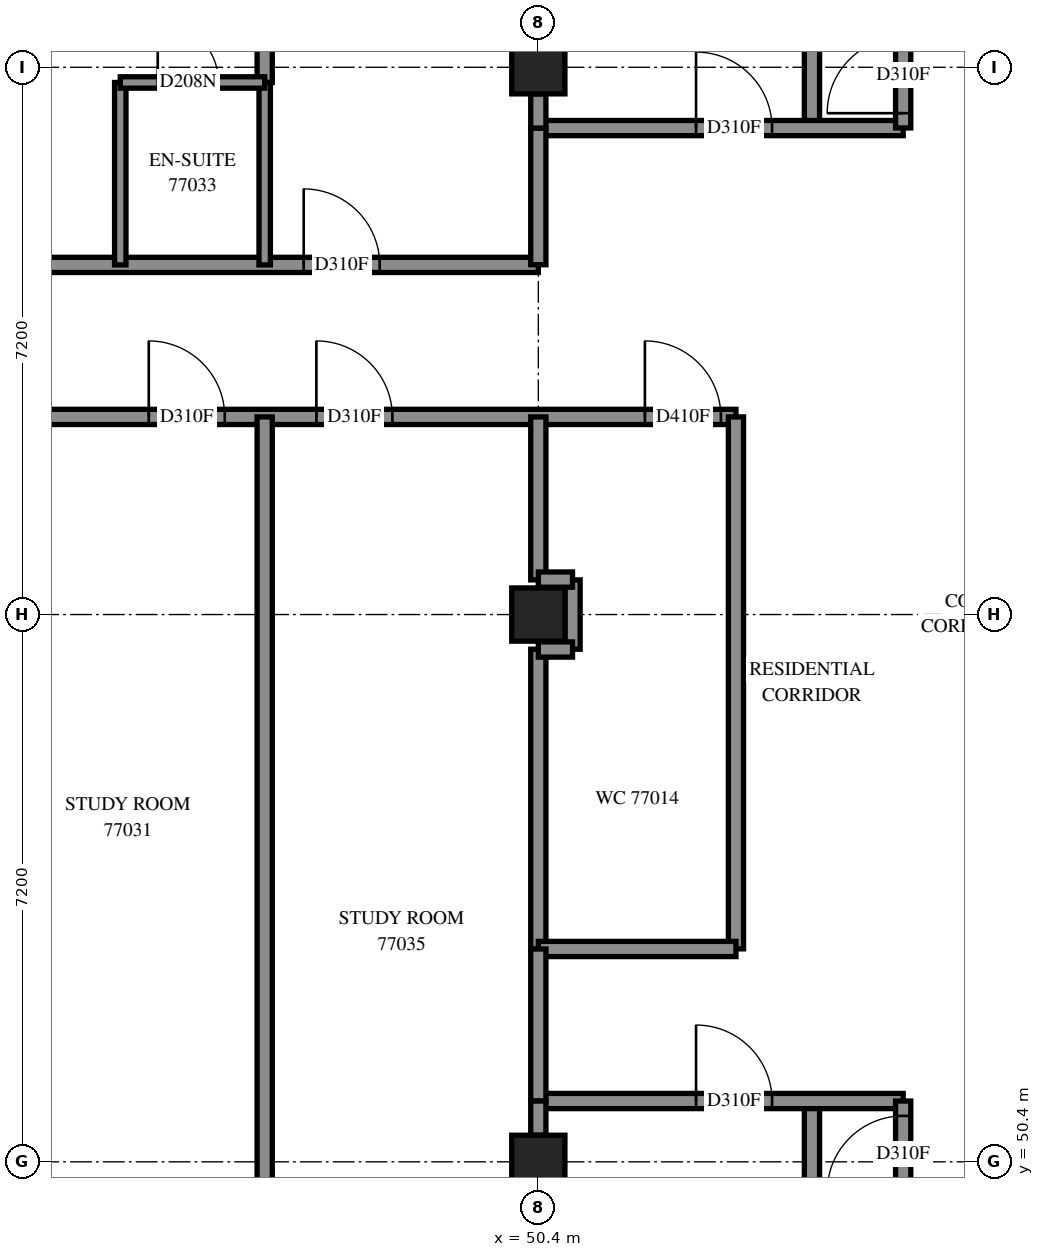
"""IFC4 building model, lengths in metres.
Left out: names, types, materials, properties, quantities, classifications, styles, units other than length and angle.
Written with IfcOpenShell. Run it as: python <this file> out.ifc"""

import sys

from ifc_helpers import new_model, si_unit, direction, frame, frame_2d, origin, origin_2d, place, context, subcontext, project, spatial, rectangle, extrude, element, fill, save


model = new_model("IFC4")
c1 = context("Model", 3, precision=1e-05, world=origin(), true_north=direction((0.0, 1.0)))
c2 = subcontext(c1, "Body", "Model", "MODEL_VIEW")
j1 = project(units=[si_unit("LENGTHUNIT", "METRE"), si_unit("PLANEANGLEUNIT", "RADIAN")], contexts=[c1])
p1 = place(None, origin())
s1 = spatial("IfcSite", under=j1, at=p1, CompositionType="ELEMENT")
p2 = place(p1, origin())
s2 = spatial("IfcBuilding", under=s1, at=p2, CompositionType="ELEMENT")
p3 = place(p2, frame((0.0, 0.0, 281.2)))
s3 = spatial("IfcBuildingStorey", under=s2, at=p3, CompositionType="ELEMENT", Elevation=281.2)
for number, where, z_axis, x_axis in (
    (1, (50.4, 50.4, 0.0), (0.0, 0.0, 1.0), (1.0, 0.0, 0.0)),
    (2, (50.4, 57.6, 0.0), (0.0, 0.0, 1.0), (1.0, 0.0, 0.0)),
    (3, (50.4, 64.8, 0.0), (0.0, 0.0, 1.0), (1.0, 0.0, 0.0)),
):
    element("IfcColumn", number, at=place(p3, frame(where, z_axis=z_axis, x_axis=x_axis)), inside=s3, PredefinedType="COLUMN", context=c2, shape_type="SweptSolid", body=[
        extrude(rectangle(XDim=0.7, YDim=0.7, at=origin_2d()), origin(), (0.0, 0.0, 1.0), 3.1),
    ])
p4 = place(p3, frame((36.0, 60.2, 0.0), z_axis=(0.0, 0.0, 1.0), x_axis=(1.0, 0.0, 0.0)))
e4 = element("IfcWall", 4, at=p4, inside=s3, PredefinedType="PARTITIONING", context=c2, shape_type="SweptSolid", body=[
    extrude(rectangle(XDim=17.0, YDim=0.2, at=frame_2d((8.5, 0.0))), origin(), (0.0, 0.0, 1.0), 3.1),
])
p5 = place(p4, frame((15.802, 0.0, 0.0)))
e5 = element("IfcOpeningElement", 5, at=p5, cuts=e4, PredefinedType="OPENING", context=c2, shape_type="SweptSolid", body=[
    extrude(rectangle(XDim=1.0, YDim=2.1, at=frame_2d((0.5, 1.05))), frame((0.0, 0.11, 0.0), z_axis=(0.0, -1.0, 0.0), x_axis=(1.0, 0.0, 0.0)), (0.0, 0.0, 1.0), 0.22),
])
p6 = place(p4, frame((2.075, 0.0, 0.0)))
e6 = element("IfcOpeningElement", 6, at=p6, cuts=e4, PredefinedType="OPENING", context=c2, shape_type="SweptSolid", body=[
    extrude(rectangle(XDim=1.0, YDim=2.1, at=frame_2d((0.5, 1.05))), frame((0.0, 0.11, 0.0), z_axis=(0.0, -1.0, 0.0), x_axis=(1.0, 0.0, 0.0)), (0.0, 0.0, 1.0), 0.22),
])
p7 = place(p4, frame((4.125, 0.0, 0.0)))
e7 = element("IfcOpeningElement", 7, at=p7, cuts=e4, PredefinedType="OPENING", context=c2, shape_type="SweptSolid", body=[
    extrude(rectangle(XDim=1.0, YDim=2.1, at=frame_2d((0.5, 1.05))), frame((0.0, 0.11, 0.0), z_axis=(0.0, -1.0, 0.0), x_axis=(1.0, 0.0, 0.0)), (0.0, 0.0, 1.0), 0.22),
])
p8 = place(p4, frame((9.275, 0.0, 0.0)))
e8 = element("IfcOpeningElement", 8, at=p8, cuts=e4, PredefinedType="OPENING", context=c2, shape_type="SweptSolid", body=[
    extrude(rectangle(XDim=1.0, YDim=2.1, at=frame_2d((0.5, 1.05))), frame((0.0, 0.11, 0.0), z_axis=(0.0, -1.0, 0.0), x_axis=(1.0, 0.0, 0.0)), (0.0, 0.0, 1.0), 0.22),
])
p9 = place(p4, frame((11.48, 0.0, 0.0)))
e9 = element("IfcOpeningElement", 9, at=p9, cuts=e4, PredefinedType="OPENING", context=c2, shape_type="SweptSolid", body=[
    extrude(rectangle(XDim=1.0, YDim=2.1, at=frame_2d((0.5, 1.05))), frame((0.0, 0.11, 0.0), z_axis=(0.0, -1.0, 0.0), x_axis=(1.0, 0.0, 0.0)), (0.0, 0.0, 1.0), 0.22),
])
p10 = place(p3, frame((46.8, 49.65, 0.0), z_axis=(0.0, 0.0, 1.0), x_axis=(0.0, 1.0, 0.0)))
e10 = element("IfcWall", 10, at=p10, inside=s3, PredefinedType="PARTITIONING", context=c2, shape_type="SweptSolid", body=[
    extrude(rectangle(XDim=10.55, YDim=0.2, at=frame_2d((5.275, 0.0))), origin(), (0.0, 0.0, 1.0), 3.1),
])
p11 = place(p3, frame((40.602, 62.2, 0.0), z_axis=(0.0, 0.0, 1.0), x_axis=(1.0, 0.0, 0.0)))
e11 = element("IfcWall", 11, at=p11, inside=s3, PredefinedType="PARTITIONING", context=c2, shape_type="SweptSolid", body=[
    extrude(rectangle(XDim=9.798, YDim=0.2, at=frame_2d((4.899, 0.0))), origin(), (0.0, 0.0, 1.0), 3.1),
])
p12 = place(p11, frame((1.306, 0.0, 0.0)))
e12 = element("IfcOpeningElement", 12, at=p12, cuts=e11, PredefinedType="OPENING", context=c2, shape_type="SweptSolid", body=[
    extrude(rectangle(XDim=0.9, YDim=2.1, at=frame_2d((0.45, 1.05))), frame((0.0, 0.11, 0.0), z_axis=(0.0, -1.0, 0.0), x_axis=(1.0, 0.0, 0.0)), (0.0, 0.0, 1.0), 0.22),
])
p13 = place(p11, frame((6.711, 0.0, 0.0)))
e13 = element("IfcOpeningElement", 13, at=p13, cuts=e11, PredefinedType="OPENING", context=c2, shape_type="SweptSolid", body=[
    extrude(rectangle(XDim=1.0, YDim=2.1, at=frame_2d((0.5, 1.05))), frame((0.0, 0.11, 0.0), z_axis=(0.0, -1.0, 0.0), x_axis=(1.0, 0.0, 0.0)), (0.0, 0.0, 1.0), 0.22),
])
p14 = place(p3, frame((54.0, 64.0, 0.0), z_axis=(0.0, 0.0, 1.0), x_axis=(0.0, 1.0, 0.0)))
e14 = element("IfcWall", 14, at=p14, inside=s3, PredefinedType="PARTITIONING", context=c2, shape_type="SweptSolid", body=[
    extrude(rectangle(XDim=8.862, YDim=0.2, at=frame_2d((4.431, 0.0))), origin(), (0.0, 0.0, 1.0), 3.1),
])
p15 = place(p3, frame((54.0, 42.45, 0.0), z_axis=(0.0, 0.0, 1.0), x_axis=(0.0, 1.0, 0.0)))
e15 = element("IfcWall", 15, at=p15, inside=s3, PredefinedType="PARTITIONING", context=c2, shape_type="SweptSolid", body=[
    extrude(rectangle(XDim=8.75, YDim=0.2, at=frame_2d((4.375, 0.0))), origin(), (0.0, 0.0, 1.0), 3.1),
])
p16 = place(p3, frame((46.8, 64.6, 0.0), z_axis=(0.0, 0.0, 1.0), x_axis=(0.0, 1.0, 0.0)))
e16 = element("IfcWall", 16, at=p16, inside=s3, PredefinedType="PARTITIONING", context=c2, shape_type="SweptSolid", body=[
    extrude(rectangle(XDim=8.15, YDim=0.2, at=frame_2d((4.075, 0.0))), origin(), (0.0, 0.0, 1.0), 3.1),
])
p17 = place(p3, frame((53.0, 53.202, 0.0), z_axis=(0.0, 0.0, 1.0), x_axis=(0.0, 1.0, 0.0)))
e17 = element("IfcWall", 17, at=p17, inside=s3, PredefinedType="PARTITIONING", context=c2, shape_type="SweptSolid", body=[
    extrude(rectangle(XDim=6.998, YDim=0.2, at=frame_2d((3.499, 0.0))), origin(), (0.0, 0.0, 1.0), 3.1),
])
p18 = place(p3, frame((50.4, 51.2, 0.0), z_axis=(0.0, 0.0, 1.0), x_axis=(1.0, 0.0, 0.0)))
e18 = element("IfcWall", 18, at=p18, inside=s3, PredefinedType="PARTITIONING", context=c2, shape_type="SweptSolid", body=[
    extrude(rectangle(XDim=4.8, YDim=0.2, at=frame_2d((2.4, 0.0))), origin(), (0.0, 0.0, 1.0), 3.1),
])
p19 = place(p18, frame((2.075, 0.0, 0.0)))
e19 = element("IfcOpeningElement", 19, at=p19, cuts=e18, PredefinedType="OPENING", context=c2, shape_type="SweptSolid", body=[
    extrude(rectangle(XDim=1.0, YDim=2.1, at=frame_2d((0.5, 1.05))), frame((0.0, 0.11, 0.0), z_axis=(0.0, -1.0, 0.0), x_axis=(1.0, 0.0, 0.0)), (0.0, 0.0, 1.0), 0.22),
])
p20 = place(p3, frame((50.4, 64.0, 0.0), z_axis=(0.0, 0.0, 1.0), x_axis=(1.0, 0.0, 0.0)))
e20 = element("IfcWall", 20, at=p20, inside=s3, PredefinedType="PARTITIONING", context=c2, shape_type="SweptSolid", body=[
    extrude(rectangle(XDim=4.8, YDim=0.2, at=frame_2d((2.4, 0.0))), origin(), (0.0, 0.0, 1.0), 3.1),
])
p21 = place(p20, frame((2.075, 0.0, 0.0)))
e21 = element("IfcOpeningElement", 21, at=p21, cuts=e20, PredefinedType="OPENING", context=c2, shape_type="SweptSolid", body=[
    extrude(rectangle(XDim=1.0, YDim=2.1, at=frame_2d((0.5, 1.05))), frame((0.0, 0.11, 0.0), z_axis=(0.0, -1.0, 0.0), x_axis=(1.0, 0.0, 0.0)), (0.0, 0.0, 1.0), 0.22),
])
p22 = place(p3, frame((50.4, 53.2, 0.0), z_axis=(0.0, 0.0, 1.0), x_axis=(0.0, 1.0, 0.0)))
e22 = element("IfcWall", 22, at=p22, inside=s3, PredefinedType="PARTITIONING", context=c2, shape_type="SweptSolid", body=[
    extrude(rectangle(XDim=3.944, YDim=0.2, at=frame_2d((1.972, 0.0))), origin(), (0.0, 0.0, 1.0), 3.1),
])
p23 = place(p3, frame((55.2, 48.0, 0.0), z_axis=(0.0, 0.0, 1.0), x_axis=(0.0, 1.0, 0.0)))
e23 = element("IfcWall", 23, at=p23, inside=s3, PredefinedType="PARTITIONING", context=c2, shape_type="SweptSolid", body=[
    extrude(rectangle(XDim=3.2, YDim=0.2, at=frame_2d((1.6, 0.0))), origin(), (0.0, 0.0, 1.0), 3.1),
])
p24 = place(p23, frame((2.004, 0.0, 0.0)))
e24 = element("IfcOpeningElement", 24, at=p24, cuts=e23, PredefinedType="OPENING", context=c2, shape_type="SweptSolid", body=[
    extrude(rectangle(XDim=1.0, YDim=2.1, at=frame_2d((0.5, 1.05))), frame((0.0, 0.11, 0.0), z_axis=(0.0, -1.0, 0.0), x_axis=(1.0, 0.0, 0.0)), (0.0, 0.0, 1.0), 0.22),
])
p25 = place(p3, frame((55.2, 64.002, 0.0), z_axis=(0.0, 0.0, 1.0), x_axis=(0.0, 1.0, 0.0)))
e25 = element("IfcWall", 25, at=p25, inside=s3, PredefinedType="PARTITIONING", context=c2, shape_type="SweptSolid", body=[
    extrude(rectangle(XDim=3.198, YDim=0.2, at=frame_2d((1.599, 0.0))), origin(), (0.0, 0.0, 1.0), 3.1),
])
p26 = place(p25, frame((0.194, 0.0, 0.0)))
e26 = element("IfcOpeningElement", 26, at=p26, cuts=e25, PredefinedType="OPENING", context=c2, shape_type="SweptSolid", body=[
    extrude(rectangle(XDim=1.0, YDim=2.1, at=frame_2d((0.5, 1.05))), frame((0.0, 0.11, 0.0), z_axis=(0.0, -1.0, 0.0), x_axis=(1.0, 0.0, 0.0)), (0.0, 0.0, 1.0), 0.22),
])
p27 = place(p3, frame((50.4, 53.2, 0.0), z_axis=(0.0, 0.0, 1.0), x_axis=(1.0, 0.0, 0.0)))
e27 = element("IfcWall", 27, at=p27, inside=s3, PredefinedType="PARTITIONING", context=c2, shape_type="SweptSolid", body=[
    extrude(rectangle(XDim=2.6, YDim=0.2, at=frame_2d((1.3, 0.0))), origin(), (0.0, 0.0, 1.0), 3.1),
])
for number, where, z_axis, x_axis in (
    (28, (44.9, 62.2, 0.0), (0.0, 0.0, 1.0), (0.0, 1.0, 0.0)),
    (29, (46.8, 62.2, 0.0), (0.0, 0.0, 1.0), (0.0, 1.0, 0.0)),
):
    element("IfcWall", number, at=place(p3, frame(where, z_axis=z_axis, x_axis=x_axis)), inside=s3, PredefinedType="PARTITIONING", context=c2, shape_type="SweptSolid", body=[
        extrude(rectangle(XDim=2.4, YDim=0.15, at=frame_2d((1.2, 0.0))), origin(), (0.0, 0.0, 1.0), 3.1),
    ])
p28 = place(p3, frame((50.4, 58.056, 0.0), z_axis=(0.0, 0.0, 1.0), x_axis=(0.0, 1.0, 0.0)))
e30 = element("IfcWall", 30, at=p28, inside=s3, PredefinedType="PARTITIONING", context=c2, shape_type="SweptSolid", body=[
    extrude(rectangle(XDim=2.144, YDim=0.2, at=frame_2d((1.072, 0.0))), origin(), (0.0, 0.0, 1.0), 3.1),
])
p29 = place(p3, frame((50.4, 51.2, 0.0), z_axis=(0.0, 0.0, 1.0), x_axis=(0.0, 1.0, 0.0)))
e31 = element("IfcWall", 31, at=p29, inside=s3, PredefinedType="PARTITIONING", context=c2, shape_type="SweptSolid", body=[
    extrude(rectangle(XDim=2.0, YDim=0.2, at=frame_2d((1.0, 0.0))), origin(), (0.0, 0.0, 1.0), 3.1),
])
p30 = place(p3, frame((44.9, 64.6, 0.0), z_axis=(0.0, 0.0, 1.0), x_axis=(1.0, 0.0, 0.0)))
e32 = element("IfcWall", 32, at=p30, inside=s3, PredefinedType="PARTITIONING", context=c2, shape_type="SweptSolid", body=[
    extrude(rectangle(XDim=1.9, YDim=0.15, at=frame_2d((0.95, 0.0))), origin(), (0.0, 0.0, 1.0), 3.1),
])
p31 = place(p30, frame((0.493, 0.0, 0.0)))
e33 = element("IfcOpeningElement", 33, at=p31, cuts=e32, PredefinedType="OPENING", context=c2, shape_type="SweptSolid", body=[
    extrude(rectangle(XDim=0.8, YDim=2.1, at=frame_2d((0.4, 1.05))), frame((0.0, 0.085, 0.0), z_axis=(0.0, -1.0, 0.0), x_axis=(1.0, 0.0, 0.0)), (0.0, 0.0, 1.0), 0.17),
])
p32 = place(p3, frame((50.4, 62.202, 0.0), z_axis=(0.0, 0.0, 1.0), x_axis=(0.0, 1.0, 0.0)))
e34 = element("IfcWall", 34, at=p32, inside=s3, PredefinedType="PARTITIONING", context=c2, shape_type="SweptSolid", body=[
    extrude(rectangle(XDim=1.798, YDim=0.2, at=frame_2d((0.899, 0.0))), origin(), (0.0, 0.0, 1.0), 3.1),
])
p33 = place(p3, frame((50.85, 57.144, 0.0), z_axis=(0.0, 0.0, 1.0), x_axis=(0.0, 1.0, 0.0)))
e35 = element("IfcWall", 35, at=p33, inside=s3, PredefinedType="PARTITIONING", context=c2, shape_type="SweptSolid", body=[
    extrude(rectangle(XDim=0.912, YDim=0.2, at=frame_2d((0.456, 0.0))), origin(), (0.0, 0.0, 1.0), 3.1),
])
for number, where, z_axis, x_axis in (
    (36, (50.4, 50.75, 0.0), (0.0, 0.0, 1.0), (0.0, 1.0, 0.0)),
    (37, (50.4, 64.0, 0.0), (0.0, 0.0, 1.0), (0.0, 1.0, 0.0)),
    (38, (50.4, 57.14, 0.0), (0.0, 0.0, 1.0), (1.0, 0.0, 0.0)),
    (39, (50.4, 58.06, 0.0), (0.0, 0.0, 1.0), (1.0, 0.0, 0.0)),
):
    element("IfcWall", number, at=place(p3, frame(where, z_axis=z_axis, x_axis=x_axis)), inside=s3, PredefinedType="PARTITIONING", context=c2, shape_type="SweptSolid", body=[
        extrude(rectangle(XDim=0.45, YDim=0.2, at=frame_2d((0.225, 0.0))), origin(), (0.0, 0.0, 1.0), 3.1),
    ])
p34 = place(p5, origin())
e40 = element("IfcDoor", 40, at=p34, inside=s3, OperationType="SINGLE_SWING_LEFT", PredefinedType="DOOR", context=c2, shape_type="SweptSolid", body=[
    extrude(rectangle(XDim=1.0, YDim=2.1, at=frame_2d((0.5, 1.05))), frame((0.0, 0.025, 0.0), z_axis=(0.0, -1.0, 0.0), x_axis=(1.0, 0.0, 0.0)), (0.0, 0.0, 1.0), 0.05),
])
fill(e5, e40)
p35 = place(p21, origin())
e41 = element("IfcDoor", 41, at=p35, inside=s3, OperationType="SINGLE_SWING_RIGHT", PredefinedType="DOOR", context=c2, shape_type="SweptSolid", body=[
    extrude(rectangle(XDim=1.0, YDim=2.1, at=frame_2d((0.5, 1.05))), frame((0.0, 0.025, 0.0), z_axis=(0.0, -1.0, 0.0), x_axis=(1.0, 0.0, 0.0)), (0.0, 0.0, 1.0), 0.05),
])
fill(e21, e41)
p36 = place(p26, origin())
e42 = element("IfcDoor", 42, at=p36, inside=s3, OperationType="SINGLE_SWING_LEFT", PredefinedType="DOOR", context=c2, shape_type="SweptSolid", body=[
    extrude(rectangle(XDim=1.0, YDim=2.1, at=frame_2d((0.5, 1.05))), frame((0.0, 0.025, 0.0), z_axis=(0.0, -1.0, 0.0), x_axis=(1.0, 0.0, 0.0)), (0.0, 0.0, 1.0), 0.05),
])
fill(e26, e42)
p37 = place(p8, origin())
e43 = element("IfcDoor", 43, at=p37, inside=s3, OperationType="SINGLE_SWING_LEFT", PredefinedType="DOOR", context=c2, shape_type="SweptSolid", body=[
    extrude(rectangle(XDim=1.0, YDim=2.1, at=frame_2d((0.5, 1.05))), frame((0.0, 0.025, 0.0), z_axis=(0.0, -1.0, 0.0), x_axis=(1.0, 0.0, 0.0)), (0.0, 0.0, 1.0), 0.05),
])
fill(e8, e43)
p38 = place(p31, origin())
e44 = element("IfcDoor", 44, at=p38, inside=s3, OperationType="SINGLE_SWING_RIGHT", PredefinedType="DOOR", context=c2, shape_type="SweptSolid", body=[
    extrude(rectangle(XDim=0.8, YDim=2.1, at=frame_2d((0.4, 1.05))), frame((0.0, 0.025, 0.0), z_axis=(0.0, -1.0, 0.0), x_axis=(1.0, 0.0, 0.0)), (0.0, 0.0, 1.0), 0.05),
])
fill(e33, e44)
p39 = place(p13, origin())
e45 = element("IfcDoor", 45, at=p39, inside=s3, OperationType="SINGLE_SWING_LEFT", PredefinedType="DOOR", context=c2, shape_type="SweptSolid", body=[
    extrude(rectangle(XDim=1.0, YDim=2.1, at=frame_2d((0.5, 1.05))), frame((0.0, 0.025, 0.0), z_axis=(0.0, -1.0, 0.0), x_axis=(1.0, 0.0, 0.0)), (0.0, 0.0, 1.0), 0.05),
])
fill(e13, e45)
p40 = place(p9, origin())
e46 = element("IfcDoor", 46, at=p40, inside=s3, OperationType="SINGLE_SWING_RIGHT", PredefinedType="DOOR", context=c2, shape_type="SweptSolid", body=[
    extrude(rectangle(XDim=1.0, YDim=2.1, at=frame_2d((0.5, 1.05))), frame((0.0, 0.025, 0.0), z_axis=(0.0, -1.0, 0.0), x_axis=(1.0, 0.0, 0.0)), (0.0, 0.0, 1.0), 0.05),
])
fill(e9, e46)
p41 = place(p19, origin())
e47 = element("IfcDoor", 47, at=p41, inside=s3, OperationType="SINGLE_SWING_LEFT", PredefinedType="DOOR", context=c2, shape_type="SweptSolid", body=[
    extrude(rectangle(XDim=1.0, YDim=2.1, at=frame_2d((0.5, 1.05))), frame((0.0, 0.025, 0.0), z_axis=(0.0, -1.0, 0.0), x_axis=(1.0, 0.0, 0.0)), (0.0, 0.0, 1.0), 0.05),
])
fill(e19, e47)
p42 = place(p24, origin())
e48 = element("IfcDoor", 48, at=p42, inside=s3, OperationType="SINGLE_SWING_RIGHT", PredefinedType="DOOR", context=c2, shape_type="SweptSolid", body=[
    extrude(rectangle(XDim=1.0, YDim=2.1, at=frame_2d((0.5, 1.05))), frame((0.0, 0.025, 0.0), z_axis=(0.0, -1.0, 0.0), x_axis=(1.0, 0.0, 0.0)), (0.0, 0.0, 1.0), 0.05),
])
fill(e24, e48)
save(model, sys.argv[1])
